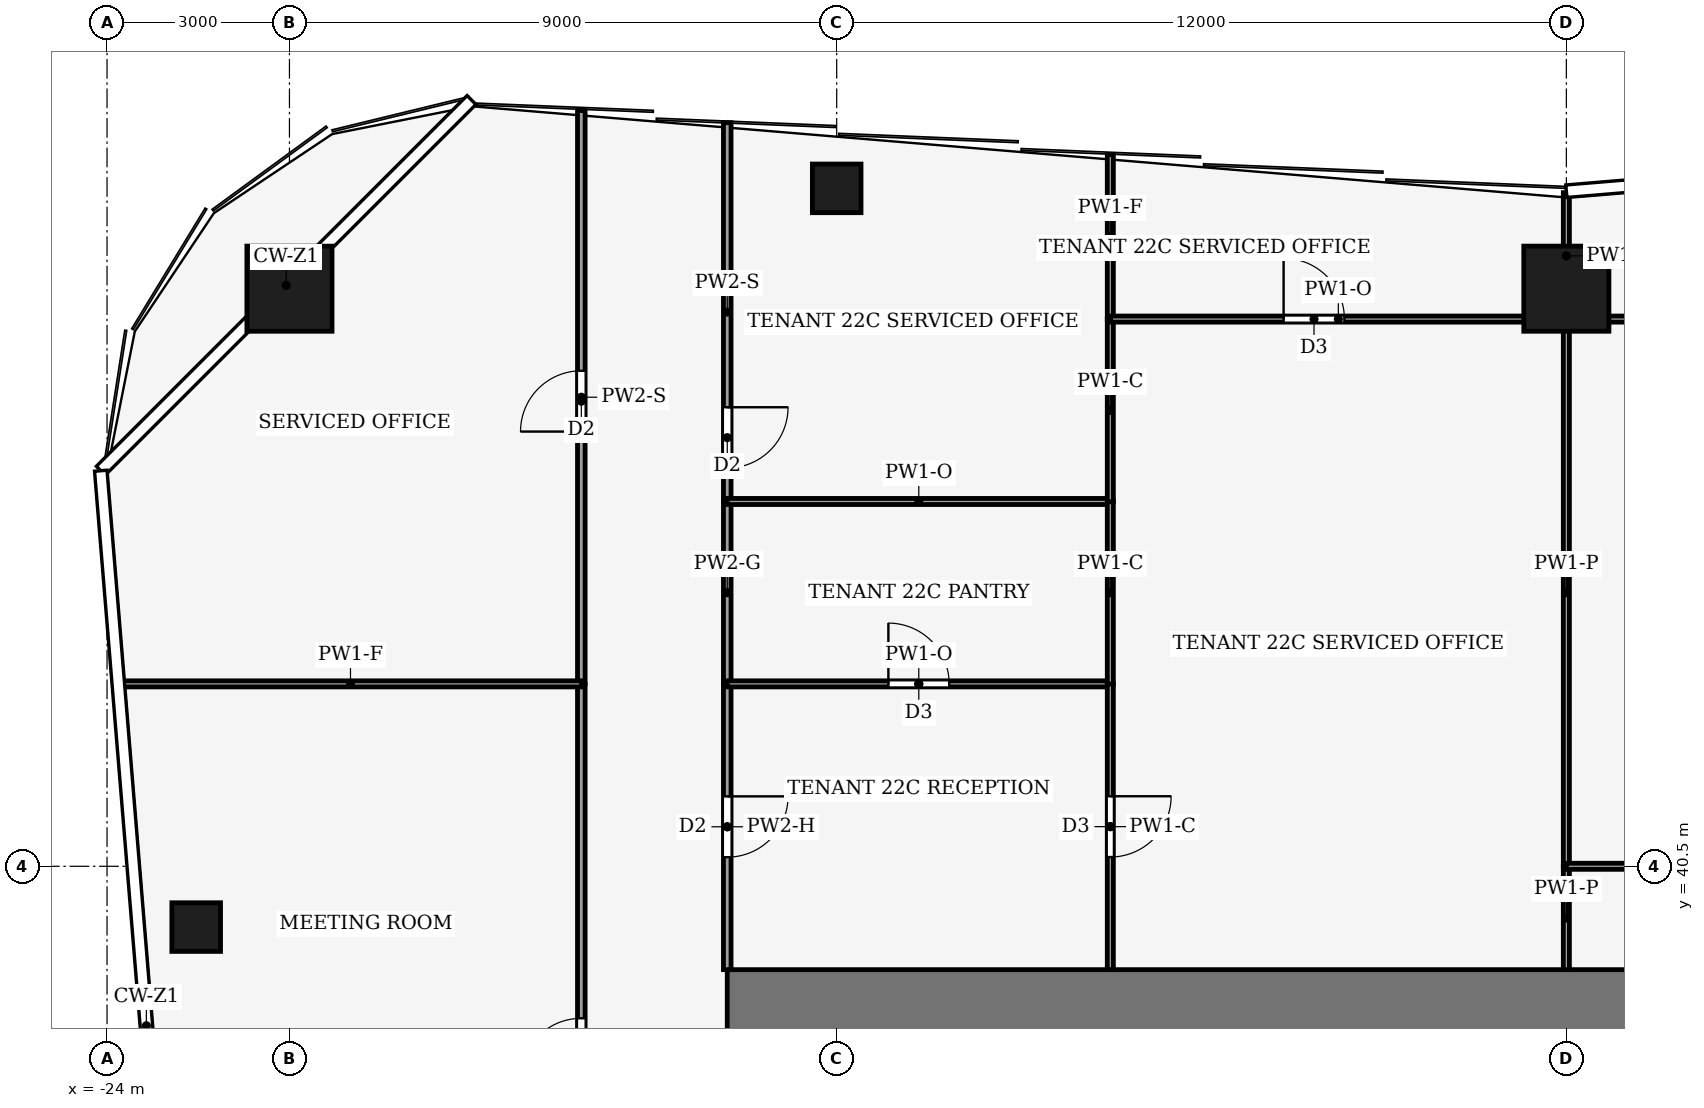
"""IFC4 building model, lengths in metres.
Left out: names, types, materials, properties, quantities, classifications, styles, units other than length and angle.
Written with IfcOpenShell. Run it as: python <this file> out.ifc"""

import sys

from ifc_helpers import new_model, si_unit, direction, frame, frame_2d, origin, origin_2d, place, context, subcontext, project, spatial, rectangle, hollow_rectangle, extrude, element, fill, save


model = new_model("IFC4")
c1 = context("Model", 3, precision=1e-05, world=origin(), true_north=direction((0.0, 1.0)))
c2 = subcontext(c1, "Body", "Model", "MODEL_VIEW")
j1 = project(units=[si_unit("LENGTHUNIT", "METRE"), si_unit("PLANEANGLEUNIT", "RADIAN")], contexts=[c1])
p1 = place(None, origin())
s1 = spatial("IfcSite", under=j1, at=p1, CompositionType="ELEMENT")
p2 = place(p1, origin())
s2 = spatial("IfcBuilding", under=s1, at=p2, CompositionType="ELEMENT")
p3 = place(p2, frame((0.0, 0.0, 98.0)))
s3 = spatial("IfcBuildingStorey", under=s2, at=p3, CompositionType="ELEMENT", Elevation=98.0)
p4 = place(p3, frame((-13.8, 38.2, -0.13), z_axis=(0.0, 0.0, 1.0), x_axis=(1.0, 0.0, 0.0)))
e1 = element("IfcWall", 1, at=p4, inside=s3, PredefinedType="SHEAR", context=c2, shape_type="SweptSolid", body=[
    extrude(rectangle(XDim=27.6, YDim=1.2, at=frame_2d((13.8, 0.0))), origin(), (0.0, 0.0, 1.0), 4.0),
])
for number, where, z_axis, x_axis in (
    (2, (-21.0, 50.0, 0.0), (0.0, 0.0, 1.0), (1.0, 0.0, 0.0)),
    (3, (0.0, 50.0, 0.0), (0.0, 0.0, 1.0), (1.0, 0.0, 0.0)),
):
    element("IfcColumn", number, at=place(p3, frame(where, z_axis=z_axis, x_axis=x_axis)), inside=s3, PredefinedType="COLUMN", context=c2, shape_type="SweptSolid", body=[
        extrude(hollow_rectangle(XDim=1.4, YDim=1.4, WallThickness=0.08, at=origin_2d()), origin(), (0.0, 0.0, 1.0), 4.0),
    ])
for number, where, z_axis, x_axis in (
    (4, (-12.0, 51.65, 0.0), (0.0, 0.0, 1.0), (1.0, 0.0, 0.0)),
    (5, (-22.534, 39.5, 0.0), (0.0, 0.0, 1.0), (1.0, 0.0, 0.0)),
):
    element("IfcColumn", number, at=place(p3, frame(where, z_axis=z_axis, x_axis=x_axis)), inside=s3, PredefinedType="COLUMN", context=c2, shape_type="SweptSolid", body=[
        extrude(hollow_rectangle(XDim=0.8, YDim=0.8, WallThickness=0.04, at=origin_2d()), origin(), (0.0, 0.0, 1.0), 4.0),
    ])
p5 = place(p3, frame((-16.2, 31.5, 0.0), z_axis=(0.0, 0.0, 1.0), x_axis=(0.0, 1.0, 0.0)))
e6 = element("IfcWall", 6, at=p5, inside=s3, PredefinedType="PARTITIONING", context=c2, shape_type="SweptSolid", body=[
    extrude(rectangle(XDim=12.0, YDim=0.125, at=frame_2d((6.0, 0.0))), origin(), (0.0, 0.0, 1.0), 3.14),
])
p6 = place(p5, frame((5.5, 0.0, 0.0)))
e7 = element("IfcOpeningElement", 7, at=p6, cuts=e6, PredefinedType="OPENING", context=c2, shape_type="SweptSolid", body=[
    extrude(rectangle(XDim=1.0, YDim=2.1, at=frame_2d((0.5, 1.05))), frame((0.0, 0.073, 0.0), z_axis=(0.0, -1.0, 0.0), x_axis=(1.0, 0.0, 0.0)), (0.0, 0.0, 1.0), 0.145),
])
p7 = place(p3, frame((-16.2, 43.5, 0.0), z_axis=(0.0, 0.0, 1.0), x_axis=(0.0, 1.0, 0.0)))
e8 = element("IfcWall", 8, at=p7, inside=s3, PredefinedType="PARTITIONING", context=c2, shape_type="SweptSolid", body=[
    extrude(rectangle(XDim=9.43, YDim=0.125, at=frame_2d((4.715, 0.0))), origin(), (0.0, 0.0, 1.0), 3.04),
])
p8 = place(p7, frame((4.15, 0.0, 0.0)))
e9 = element("IfcOpeningElement", 9, at=p8, cuts=e8, PredefinedType="OPENING", context=c2, shape_type="SweptSolid", body=[
    extrude(rectangle(XDim=1.0, YDim=2.1, at=frame_2d((0.5, 1.05))), frame((0.0, 0.073, 0.0), z_axis=(0.0, -1.0, 0.0), x_axis=(1.0, 0.0, 0.0)), (0.0, 0.0, 1.0), 0.145),
])
p9 = place(p3, frame((-13.8, 43.5, 0.0), z_axis=(0.0, 0.0, 1.0), x_axis=(0.0, -1.0, 0.0)))
e10 = element("IfcWall", 10, at=p9, inside=s3, PredefinedType="PARTITIONING", context=c2, shape_type="SweptSolid", body=[
    extrude(rectangle(XDim=4.7, YDim=0.125, at=frame_2d((2.35, 0.0))), origin(), (0.0, 0.0, 1.0), 3.14),
])
p10 = place(p9, frame((1.85, 0.0, 0.0)))
e11 = element("IfcOpeningElement", 11, at=p10, cuts=e10, PredefinedType="OPENING", context=c2, shape_type="SweptSolid", body=[
    extrude(rectangle(XDim=1.0, YDim=2.1, at=frame_2d((0.5, 1.05))), frame((0.0, 0.073, 0.0), z_axis=(0.0, -1.0, 0.0), x_axis=(1.0, 0.0, 0.0)), (0.0, 0.0, 1.0), 0.145),
])
p11 = place(p3, frame((-13.8, 43.5, 0.0), z_axis=(0.0, 0.0, 1.0), x_axis=(0.0, 1.0, 0.0)))
e12 = element("IfcWall", 12, at=p11, inside=s3, PredefinedType="PARTITIONING", context=c2, shape_type="SweptSolid", body=[
    extrude(rectangle(XDim=3.0, YDim=0.125, at=frame_2d((1.5, 0.0))), origin(), (0.0, 0.0, 1.0), 3.87),
])
p12 = place(p3, frame((-13.8, 52.73, 0.0), z_axis=(0.0, 0.0, 1.0), x_axis=(0.0, -1.0, 0.0)))
e13 = element("IfcWall", 13, at=p12, inside=s3, PredefinedType="PARTITIONING", context=c2, shape_type="SweptSolid", body=[
    extrude(rectangle(XDim=6.23, YDim=0.125, at=frame_2d((3.115, 0.0))), origin(), (0.0, 0.0, 1.0), 3.04),
])
p13 = place(p12, frame((4.68, 0.0, 0.0)))
e14 = element("IfcOpeningElement", 14, at=p13, cuts=e13, PredefinedType="OPENING", context=c2, shape_type="SweptSolid", body=[
    extrude(rectangle(XDim=1.0, YDim=2.1, at=frame_2d((0.5, 1.05))), frame((0.0, 0.073, 0.0), z_axis=(0.0, -1.0, 0.0), x_axis=(1.0, 0.0, 0.0)), (0.0, 0.0, 1.0), 0.145),
])
p14 = place(p3, frame((-16.2, 43.5, 0.0), z_axis=(0.0, 0.0, 1.0), x_axis=(-1.0, 0.0, 0.0)))
e15 = element("IfcWall", 15, at=p14, inside=s3, PredefinedType="PARTITIONING", context=c2, shape_type="SweptSolid", body=[
    extrude(rectangle(XDim=7.592, YDim=0.1, at=frame_2d((3.796, 0.0))), origin(), (0.0, 0.0, 1.0), 3.04),
])
p15 = place(p3, frame((-13.8, 43.5, 0.0), z_axis=(0.0, 0.0, 1.0), x_axis=(1.0, 0.0, 0.0)))
e16 = element("IfcWall", 16, at=p15, inside=s3, PredefinedType="PARTITIONING", context=c2, shape_type="SweptSolid", body=[
    extrude(rectangle(XDim=6.3, YDim=0.1, at=frame_2d((3.15, 0.0))), origin(), (0.0, 0.0, 1.0), 3.39),
])
p16 = place(p15, frame((2.65, 0.0, 0.0)))
e17 = element("IfcOpeningElement", 17, at=p16, cuts=e16, PredefinedType="OPENING", context=c2, shape_type="SweptSolid", body=[
    extrude(rectangle(XDim=1.0, YDim=2.1, at=frame_2d((0.5, 1.05))), frame((0.0, 0.06, 0.0), z_axis=(0.0, -1.0, 0.0), x_axis=(1.0, 0.0, 0.0)), (0.0, 0.0, 1.0), 0.12),
])
p17 = place(p3, frame((-7.5, 43.504, 0.0), z_axis=(0.0, 0.0, 1.0), x_axis=(0.0, -1.0, 0.0)))
e18 = element("IfcWall", 18, at=p17, inside=s3, PredefinedType="PARTITIONING", context=c2, shape_type="SweptSolid", body=[
    extrude(rectangle(XDim=4.704, YDim=0.1, at=frame_2d((2.352, 0.0))), origin(), (0.0, 0.0, 1.0), 3.87),
])
p18 = place(p17, frame((1.852, 0.0, 0.0)))
e19 = element("IfcOpeningElement", 19, at=p18, cuts=e18, PredefinedType="OPENING", context=c2, shape_type="SweptSolid", body=[
    extrude(rectangle(XDim=1.0, YDim=2.1, at=frame_2d((0.5, 1.05))), frame((0.0, 0.06, 0.0), z_axis=(0.0, -1.0, 0.0), x_axis=(1.0, 0.0, 0.0)), (0.0, 0.0, 1.0), 0.12),
])
p19 = place(p3, frame((-7.5, 46.5, 0.0), z_axis=(0.0, 0.0, 1.0), x_axis=(-1.0, 0.0, 0.0)))
e20 = element("IfcWall", 20, at=p19, inside=s3, PredefinedType="PARTITIONING", context=c2, shape_type="SweptSolid", body=[
    extrude(rectangle(XDim=6.3, YDim=0.1, at=frame_2d((3.15, 0.0))), origin(), (0.0, 0.0, 1.0), 3.39),
])
p20 = place(p3, frame((-7.5, 43.496, 0.0), z_axis=(0.0, 0.0, 1.0), x_axis=(0.0, 1.0, 0.0)))
e21 = element("IfcWall", 21, at=p20, inside=s3, PredefinedType="PARTITIONING", context=c2, shape_type="SweptSolid", body=[
    extrude(rectangle(XDim=3.008, YDim=0.1, at=frame_2d((1.504, 0.0))), origin(), (0.0, 0.0, 1.0), 3.87),
])
p21 = place(p3, frame((-7.5, 46.496, 0.0), z_axis=(0.0, 0.0, 1.0), x_axis=(0.0, 1.0, 0.0)))
e22 = element("IfcWall", 22, at=p21, inside=s3, PredefinedType="PARTITIONING", context=c2, shape_type="SweptSolid", body=[
    extrude(rectangle(XDim=3.004, YDim=0.1, at=frame_2d((1.502, 0.0))), origin(), (0.0, 0.0, 1.0), 3.87),
])
p22 = place(p3, frame((-7.5, 49.5, 0.0), z_axis=(0.0, 0.0, 1.0), x_axis=(0.0, 1.0, 0.0)))
e23 = element("IfcWall", 23, at=p22, inside=s3, PredefinedType="PARTITIONING", context=c2, shape_type="SweptSolid", body=[
    extrude(rectangle(XDim=2.705, YDim=0.1, at=frame_2d((1.353, 0.0))), origin(), (0.0, 0.0, 1.0), 3.04),
])
p23 = place(p3, frame((-7.5, 49.5, 0.0), z_axis=(0.0, 0.0, 1.0), x_axis=(1.0, 0.0, 0.0)))
e24 = element("IfcWall", 24, at=p23, inside=s3, PredefinedType="PARTITIONING", context=c2, shape_type="SweptSolid", body=[
    extrude(rectangle(XDim=7.5, YDim=0.1, at=frame_2d((3.75, 0.0))), origin(), (0.0, 0.0, 1.0), 3.39),
])
p24 = place(p23, frame((2.85, 0.0, 0.0)))
e25 = element("IfcOpeningElement", 25, at=p24, cuts=e24, PredefinedType="OPENING", context=c2, shape_type="SweptSolid", body=[
    extrude(rectangle(XDim=1.0, YDim=2.1, at=frame_2d((0.5, 1.05))), frame((0.0, 0.06, 0.0), z_axis=(0.0, -1.0, 0.0), x_axis=(1.0, 0.0, 0.0)), (0.0, 0.0, 1.0), 0.12),
])
p25 = place(p3, frame((0.0, 38.8, 0.0), z_axis=(0.0, 0.0, 1.0), x_axis=(0.0, 1.0, 0.0)))
e26 = element("IfcWall", 26, at=p25, inside=s3, PredefinedType="PARTITIONING", context=c2, shape_type="SweptSolid", body=[
    extrude(rectangle(XDim=1.7, YDim=0.1, at=frame_2d((0.85, 0.0))), origin(), (0.0, 0.0, 1.0), 3.44),
])
p26 = place(p3, frame((0.0, 40.5, 0.0), z_axis=(0.0, 0.0, 1.0), x_axis=(0.0, 1.0, 0.0)))
e27 = element("IfcWall", 27, at=p26, inside=s3, PredefinedType="PARTITIONING", context=c2, shape_type="SweptSolid", body=[
    extrude(rectangle(XDim=9.0, YDim=0.1, at=frame_2d((4.5, 0.0))), origin(), (0.0, 0.0, 1.0), 3.44),
])
p27 = place(p3, frame((0.0, 49.5, 0.0), z_axis=(0.0, 0.0, 1.0), x_axis=(0.0, 1.0, 0.0)))
e28 = element("IfcWall", 28, at=p27, inside=s3, PredefinedType="PARTITIONING", context=c2, shape_type="SweptSolid", body=[
    extrude(rectangle(XDim=2.08, YDim=0.1, at=frame_2d((1.04, 0.0))), origin(), (0.0, 0.0, 1.0), 3.04),
])
p28 = place(p3, frame((10.5, 40.5, 0.0), z_axis=(0.0, 0.0, 1.0), x_axis=(-1.0, 0.0, 0.0)))
e29 = element("IfcWall", 29, at=p28, inside=s3, PredefinedType="PARTITIONING", context=c2, shape_type="SweptSolid", body=[
    extrude(rectangle(XDim=10.5, YDim=0.1, at=frame_2d((5.25, 0.0))), origin(), (0.0, 0.0, 1.0), 3.39),
])
p29 = place(p28, frame((4.75, 0.0, 0.0)))
e30 = element("IfcOpeningElement", 30, at=p29, cuts=e29, PredefinedType="OPENING", context=c2, shape_type="SweptSolid", body=[
    extrude(rectangle(XDim=1.0, YDim=2.1, at=frame_2d((0.5, 1.05))), frame((0.0, 0.06, 0.0), z_axis=(0.0, -1.0, 0.0), x_axis=(1.0, 0.0, 0.0)), (0.0, 0.0, 1.0), 0.12),
])
p30 = place(p3, frame((10.5, 49.5, 0.0), z_axis=(0.0, 0.0, 1.0), x_axis=(-1.0, 0.0, 0.0)))
e31 = element("IfcWall", 31, at=p30, inside=s3, PredefinedType="PARTITIONING", context=c2, shape_type="SweptSolid", body=[
    extrude(rectangle(XDim=10.5, YDim=0.1, at=frame_2d((5.25, 0.0))), origin(), (0.0, 0.0, 1.0), 3.39),
])
p31 = place(p6, origin())
e32 = element("IfcDoor", 32, at=p31, inside=s3, OperationType="SINGLE_SWING_RIGHT", PredefinedType="DOOR", context=c2, shape_type="SweptSolid", body=[
    extrude(rectangle(XDim=1.0, YDim=2.1, at=frame_2d((0.5, 1.05))), frame((0.0, 0.025, 0.0), z_axis=(0.0, -1.0, 0.0), x_axis=(1.0, 0.0, 0.0)), (0.0, 0.0, 1.0), 0.05),
])
fill(e7, e32)
p32 = place(p8, origin())
e33 = element("IfcDoor", 33, at=p32, inside=s3, OperationType="SINGLE_SWING_LEFT", PredefinedType="DOOR", context=c2, shape_type="SweptSolid", body=[
    extrude(rectangle(XDim=1.0, YDim=2.1, at=frame_2d((0.5, 1.05))), frame((0.0, 0.025, 0.0), z_axis=(0.0, -1.0, 0.0), x_axis=(1.0, 0.0, 0.0)), (0.0, 0.0, 1.0), 0.05),
])
fill(e9, e33)
p33 = place(p10, origin())
e34 = element("IfcDoor", 34, at=p33, inside=s3, OperationType="SINGLE_SWING_LEFT", PredefinedType="DOOR", context=c2, shape_type="SweptSolid", body=[
    extrude(rectangle(XDim=1.0, YDim=2.1, at=frame_2d((0.5, 1.05))), frame((0.0, 0.025, 0.0), z_axis=(0.0, -1.0, 0.0), x_axis=(1.0, 0.0, 0.0)), (0.0, 0.0, 1.0), 0.05),
])
fill(e11, e34)
p34 = place(p13, origin())
e35 = element("IfcDoor", 35, at=p34, inside=s3, OperationType="SINGLE_SWING_RIGHT", PredefinedType="DOOR", context=c2, shape_type="SweptSolid", body=[
    extrude(rectangle(XDim=1.0, YDim=2.1, at=frame_2d((0.5, 1.05))), frame((0.0, 0.025, 0.0), z_axis=(0.0, -1.0, 0.0), x_axis=(1.0, 0.0, 0.0)), (0.0, 0.0, 1.0), 0.05),
])
fill(e14, e35)
p35 = place(p16, origin())
e36 = element("IfcDoor", 36, at=p35, inside=s3, OperationType="SINGLE_SWING_LEFT", PredefinedType="DOOR", context=c2, shape_type="SweptSolid", body=[
    extrude(rectangle(XDim=1.0, YDim=2.1, at=frame_2d((0.5, 1.05))), frame((0.0, 0.025, 0.0), z_axis=(0.0, -1.0, 0.0), x_axis=(1.0, 0.0, 0.0)), (0.0, 0.0, 1.0), 0.05),
])
fill(e17, e36)
p36 = place(p18, origin())
e37 = element("IfcDoor", 37, at=p36, inside=s3, OperationType="SINGLE_SWING_RIGHT", PredefinedType="DOOR", context=c2, shape_type="SweptSolid", body=[
    extrude(rectangle(XDim=1.0, YDim=2.1, at=frame_2d((0.5, 1.05))), frame((0.0, 0.025, 0.0), z_axis=(0.0, -1.0, 0.0), x_axis=(1.0, 0.0, 0.0)), (0.0, 0.0, 1.0), 0.05),
])
fill(e19, e37)
p37 = place(p24, origin())
e38 = element("IfcDoor", 38, at=p37, inside=s3, OperationType="SINGLE_SWING_LEFT", PredefinedType="DOOR", context=c2, shape_type="SweptSolid", body=[
    extrude(rectangle(XDim=1.0, YDim=2.1, at=frame_2d((0.5, 1.05))), frame((0.0, 0.025, 0.0), z_axis=(0.0, -1.0, 0.0), x_axis=(1.0, 0.0, 0.0)), (0.0, 0.0, 1.0), 0.05),
])
fill(e25, e38)
save(model, sys.argv[1])
